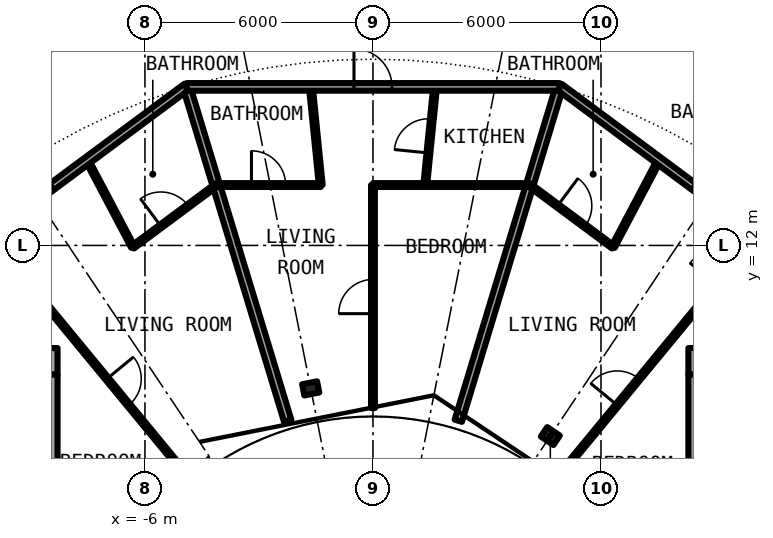
"""IFC4 building model, lengths in metres.
Left out: names, types, materials, properties, quantities, classifications, styles, units other than length and angle.
Written with IfcOpenShell. Run it as: python <this file> out.ifc"""

import sys

from ifc_helpers import new_model, si_unit, direction, frame, frame_2d, origin, origin_2d, place, context, subcontext, project, spatial, rectangle, i_section, extrude, element, fill, save


model = new_model("IFC4")
c1 = context("Model", 3, precision=1e-05, world=origin(), true_north=direction((0.0, 1.0)))
c2 = subcontext(c1, "Body", "Model", "MODEL_VIEW")
j1 = project(units=[si_unit("LENGTHUNIT", "METRE"), si_unit("PLANEANGLEUNIT", "RADIAN")], contexts=[c1])
p1 = place(None, origin())
s1 = spatial("IfcSite", under=j1, at=p1, CompositionType="ELEMENT")
p2 = place(p1, origin())
s2 = spatial("IfcBuilding", under=s1, at=p2, CompositionType="ELEMENT")
p3 = place(p2, frame((0.0, 0.0, 75.8)))
s3 = spatial("IfcBuildingStorey", under=s2, at=p3, CompositionType="ELEMENT", Elevation=75.8)
for number, where, z_axis, x_axis in (
    (1, (4.667, 6.984, 0.0), (0.0, 0.0, 1.0), (0.556, 0.831, 0.0)),
    (2, (-1.639, 8.239, 0.0), (0.0, 0.0, 1.0), (-0.195, 0.981, 0.0)),
):
    element("IfcColumn", number, at=place(p3, frame(where, z_axis=z_axis, x_axis=x_axis)), inside=s3, PredefinedType="COLUMN", context=c2, shape_type="SweptSolid", body=[
        extrude(i_section(OverallWidth=0.3, OverallDepth=0.4, WebThickness=0.013, FlangeThickness=0.024, FilletRadius=0.027, at=origin_2d()), origin(), (0.0, 0.0, 1.0), 3.05),
    ])
p4 = place(p3, frame((22.3, 8.95, 0.0), z_axis=(0.0, 0.0, 1.0), x_axis=(-1.0, 0.0, 0.0)))
e3 = element("IfcWall", 3, at=p4, inside=s3, PredefinedType="SHEAR", context=c2, shape_type="SweptSolid", body=[
    extrude(rectangle(XDim=14.0, YDim=0.7, at=frame_2d((7.0, 0.0))), origin(), (0.0, 0.0, 1.0), 3.05),
])
p5 = place(p4, frame((1.225, 0.0, 0.0)))
e4 = element("IfcOpeningElement", 4, at=p5, cuts=e3, PredefinedType="OPENING", context=c2, shape_type="SweptSolid", body=[
    extrude(rectangle(XDim=1.2, YDim=2.3, at=frame_2d((0.6, 1.15))), frame((0.0, 0.36, 0.0), z_axis=(0.0, -1.0, 0.0), x_axis=(1.0, 0.0, 0.0)), (0.0, 0.0, 1.0), 0.72),
])
p6 = place(p3, frame((8.65, -8.6, 0.0), z_axis=(0.0, 0.0, 1.0), x_axis=(0.0, 1.0, 0.0)))
e5 = element("IfcWall", 5, at=p6, inside=s3, PredefinedType="SHEAR", context=c2, shape_type="SweptSolid", body=[
    extrude(rectangle(XDim=17.2, YDim=0.7, at=frame_2d((8.6, 0.0))), origin(), (0.0, 0.0, 1.0), 3.05),
])
p7 = place(p6, frame((7.4, 0.0, 0.1)))
e6 = element("IfcOpeningElement", 6, at=p7, cuts=e5, PredefinedType="OPENING", context=c2, shape_type="SweptSolid", body=[
    extrude(rectangle(XDim=2.4, YDim=2.2, at=frame_2d((1.2, 1.1))), frame((0.0, 0.36, 0.0), z_axis=(0.0, -1.0, 0.0), x_axis=(1.0, 0.0, 0.0)), (0.0, 0.0, 1.0), 0.72),
])
p8 = place(p3, frame((-8.3, 8.95, 0.0), z_axis=(0.0, 0.0, 1.0), x_axis=(-1.0, 0.0, 0.0)))
e7 = element("IfcWall", 7, at=p8, inside=s3, PredefinedType="SHEAR", context=c2, shape_type="SweptSolid", body=[
    extrude(rectangle(XDim=14.0, YDim=0.7, at=frame_2d((7.0, 0.0))), origin(), (0.0, 0.0, 1.0), 3.05),
])
p9 = place(p8, frame((11.575, 0.0, 0.0)))
e8 = element("IfcOpeningElement", 8, at=p9, cuts=e7, PredefinedType="OPENING", context=c2, shape_type="SweptSolid", body=[
    extrude(rectangle(XDim=1.2, YDim=2.3, at=frame_2d((0.6, 1.15))), frame((0.0, 0.36, 0.0), z_axis=(0.0, -1.0, 0.0), x_axis=(1.0, 0.0, 0.0)), (0.0, 0.0, 1.0), 0.72),
])
p10 = place(p3, frame((-8.65, 8.6, 0.0), z_axis=(0.0, 0.0, 1.0), x_axis=(0.0, -1.0, 0.0)))
e9 = element("IfcWall", 9, at=p10, inside=s3, PredefinedType="SHEAR", context=c2, shape_type="SweptSolid", body=[
    extrude(rectangle(XDim=17.2, YDim=0.7, at=frame_2d((8.6, 0.0))), origin(), (0.0, 0.0, 1.0), 3.05),
])
p11 = place(p10, frame((7.4, 0.0, 0.1)))
e10 = element("IfcOpeningElement", 10, at=p11, cuts=e9, PredefinedType="OPENING", context=c2, shape_type="SweptSolid", body=[
    extrude(rectangle(XDim=2.4, YDim=2.2, at=frame_2d((1.2, 1.1))), frame((0.0, 0.36, 0.0), z_axis=(0.0, -1.0, 0.0), x_axis=(1.0, 0.0, 0.0)), (0.0, 0.0, 1.0), 0.72),
])
for number, where, z_axis, x_axis in (
    (11, (-4.907, 16.172, 0.0), (0.0, 0.0, 1.0), (0.29, -0.957, 0.0)),
    (12, (2.245, 7.387, 0.0), (0.0, 0.0, 1.0), (0.29, 0.957, 0.0)),
):
    element("IfcWall", number, at=place(p3, frame(where, z_axis=z_axis, x_axis=x_axis)), inside=s3, PredefinedType="PARTITIONING", context=c2, shape_type="SweptSolid", body=[
        extrude(rectangle(XDim=9.18, YDim=0.2, at=frame_2d((4.59, 0.0))), origin(), (0.0, 0.0, 1.0), 2.7),
    ])
p12 = place(p3, frame((-10.132, 12.296, 0.0), z_axis=(0.0, 0.0, 1.0), x_axis=(0.635976043025, -0.771708800454, 0.0)))
e13 = element("IfcWall", 13, at=p12, inside=s3, PredefinedType="PARTITIONING", context=c2, shape_type="SweptSolid", body=[
    extrude(rectangle(XDim=8.213, YDim=0.1, at=frame_2d((4.106, 0.0))), origin(), (0.0, 0.0, 1.0), 2.7),
])
p13 = place(p12, frame((0.823, 0.0, 0.0)))
e14 = element("IfcOpeningElement", 14, at=p13, cuts=e13, PredefinedType="OPENING", context=c2, shape_type="SweptSolid", body=[
    extrude(rectangle(XDim=0.9, YDim=2.3, at=frame_2d((0.45, 1.15))), frame((0.0, 0.06, 0.0), z_axis=(0.0, -1.0, 0.0), x_axis=(1.0, 0.0, 0.0)), (0.0, 0.0, 1.0), 0.12),
])
p14 = place(p12, frame((4.929, 0.0, 0.0)))
e15 = element("IfcOpeningElement", 15, at=p14, cuts=e13, PredefinedType="OPENING", context=c2, shape_type="SweptSolid", body=[
    extrude(rectangle(XDim=0.9, YDim=2.3, at=frame_2d((0.45, 1.15))), frame((0.0, 0.06, 0.0), z_axis=(0.0, -1.0, 0.0), x_axis=(1.0, 0.0, 0.0)), (0.0, 0.0, 1.0), 0.12),
])
p15 = place(p3, frame((-7.519, 14.234, 0.0), z_axis=(0.0, 0.0, 1.0), x_axis=(0.467001992543, -0.884256263173, 0.0)))
e16 = element("IfcWall", 16, at=p15, inside=s3, PredefinedType="PARTITIONING", context=c2, shape_type="SweptSolid", body=[
    extrude(rectangle(XDim=2.572, YDim=0.1, at=frame_2d((1.286, 0.0))), origin(), (0.0, 0.0, 1.0), 2.7),
])
p16 = place(p3, frame((-1.635, 16.172, 0.0), z_axis=(0.0, 0.0, 1.0), x_axis=(0.100527855112, -0.994934244233, 0.0)))
e17 = element("IfcWall", 17, at=p16, inside=s3, PredefinedType="PARTITIONING", context=c2, shape_type="SweptSolid", body=[
    extrude(rectangle(XDim=2.596, YDim=0.1, at=frame_2d((1.298, 0.0))), origin(), (0.0, 0.0, 1.0), 2.7),
])
p17 = place(p3, frame((0.0, 7.72, 0.0), z_axis=(0.0, 0.0, 1.0), x_axis=(0.0, 1.0, 0.0)))
e18 = element("IfcWall", 18, at=p17, inside=s3, PredefinedType="PARTITIONING", context=c2, shape_type="SweptSolid", body=[
    extrude(rectangle(XDim=5.869, YDim=0.1, at=frame_2d((2.935, 0.0))), origin(), (0.0, 0.0, 1.0), 2.7),
])
p18 = place(p17, frame((2.485, 0.0, 0.0)))
e19 = element("IfcOpeningElement", 19, at=p18, cuts=e18, PredefinedType="OPENING", context=c2, shape_type="SweptSolid", body=[
    extrude(rectangle(XDim=0.9, YDim=2.3, at=frame_2d((0.45, 1.15))), frame((0.0, 0.06, 0.0), z_axis=(0.0, -1.0, 0.0), x_axis=(1.0, 0.0, 0.0)), (0.0, 0.0, 1.0), 0.12),
])
p19 = place(p3, frame((1.374, 13.589, 0.0), z_axis=(0.0, 0.0, 1.0), x_axis=(0.100527855112, 0.994934244233, 0.0)))
e20 = element("IfcWall", 20, at=p19, inside=s3, PredefinedType="PARTITIONING", context=c2, shape_type="SweptSolid", body=[
    extrude(rectangle(XDim=2.596, YDim=0.1, at=frame_2d((1.298, 0.0))), origin(), (0.0, 0.0, 1.0), 2.7),
])
p20 = place(p19, frame((0.848, 0.0, 0.0)))
e21 = element("IfcOpeningElement", 21, at=p20, cuts=e20, PredefinedType="OPENING", context=c2, shape_type="SweptSolid", body=[
    extrude(rectangle(XDim=0.9, YDim=2.3, at=frame_2d((0.45, 1.15))), frame((0.0, 0.06, 0.0), z_axis=(0.0, -1.0, 0.0), x_axis=(1.0, 0.0, 0.0)), (0.0, 0.0, 1.0), 0.12),
])
p21 = place(p3, frame((4.909, 5.958, 0.0), z_axis=(0.0, 0.0, 1.0), x_axis=(0.635976043025, 0.771708800454, 0.0)))
e22 = element("IfcWall", 22, at=p21, inside=s3, PredefinedType="PARTITIONING", context=c2, shape_type="SweptSolid", body=[
    extrude(rectangle(XDim=8.213, YDim=0.1, at=frame_2d((4.106, 0.0))), origin(), (0.0, 0.0, 1.0), 2.7),
])
p22 = place(p21, frame((6.49, 0.0, 0.0)))
e23 = element("IfcOpeningElement", 23, at=p22, cuts=e22, PredefinedType="OPENING", context=c2, shape_type="SweptSolid", body=[
    extrude(rectangle(XDim=0.9, YDim=2.3, at=frame_2d((0.45, 1.15))), frame((0.0, 0.06, 0.0), z_axis=(0.0, -1.0, 0.0), x_axis=(1.0, 0.0, 0.0)), (0.0, 0.0, 1.0), 0.12),
])
p23 = place(p21, frame((2.384, 0.0, 0.0)))
e24 = element("IfcOpeningElement", 24, at=p23, cuts=e22, PredefinedType="OPENING", context=c2, shape_type="SweptSolid", body=[
    extrude(rectangle(XDim=0.9, YDim=2.3, at=frame_2d((0.45, 1.15))), frame((0.0, 0.06, 0.0), z_axis=(0.0, -1.0, 0.0), x_axis=(1.0, 0.0, 0.0)), (0.0, 0.0, 1.0), 0.12),
])
p24 = place(p3, frame((6.318, 11.96, 0.0), z_axis=(0.0, 0.0, 1.0), x_axis=(0.467001992543, 0.884256263173, 0.0)))
e25 = element("IfcWall", 25, at=p24, inside=s3, PredefinedType="PARTITIONING", context=c2, shape_type="SweptSolid", body=[
    extrude(rectangle(XDim=2.572, YDim=0.1, at=frame_2d((1.286, 0.0))), origin(), (0.0, 0.0, 1.0), 2.7),
])
p25 = place(p3, frame((-6.318, 11.96, 0.0), z_axis=(0.0, 0.0, 1.0), x_axis=(0.803128348509, 0.595806055542, 0.0)))
e26 = element("IfcWall", 26, at=p25, inside=s3, PredefinedType="PARTITIONING", context=c2, shape_type="SweptSolid", body=[
    extrude(rectangle(XDim=2.734, YDim=0.1, at=frame_2d((1.367, 0.0))), origin(), (0.0, 0.0, 1.0), 2.7),
])
p26 = place(p25, frame((0.917, 0.0, 0.0)))
e27 = element("IfcOpeningElement", 27, at=p26, cuts=e26, PredefinedType="OPENING", context=c2, shape_type="SweptSolid", body=[
    extrude(rectangle(XDim=0.9, YDim=2.3, at=frame_2d((0.45, 1.15))), frame((0.0, 0.06, 0.0), z_axis=(0.0, -1.0, 0.0), x_axis=(1.0, 0.0, 0.0)), (0.0, 0.0, 1.0), 0.12),
])
p27 = place(p3, frame((4.122, 13.589, 0.0), z_axis=(0.0, 0.0, 1.0), x_axis=(0.803128348509, -0.595806055542, 0.0)))
e28 = element("IfcWall", 28, at=p27, inside=s3, PredefinedType="PARTITIONING", context=c2, shape_type="SweptSolid", body=[
    extrude(rectangle(XDim=2.734, YDim=0.1, at=frame_2d((1.367, 0.0))), origin(), (0.0, 0.0, 1.0), 2.7),
])
p28 = place(p27, frame((0.917, 0.0, 0.0)))
e29 = element("IfcOpeningElement", 29, at=p28, cuts=e28, PredefinedType="OPENING", context=c2, shape_type="SweptSolid", body=[
    extrude(rectangle(XDim=0.9, YDim=2.3, at=frame_2d((0.45, 1.15))), frame((0.0, 0.06, 0.0), z_axis=(0.0, -1.0, 0.0), x_axis=(1.0, 0.0, 0.0)), (0.0, 0.0, 1.0), 0.12),
])
p29 = place(p3, frame((-4.122, 13.589, 0.0), z_axis=(0.0, 0.0, 1.0), x_axis=(1.0, 0.0, 0.0)))
e30 = element("IfcWall", 30, at=p29, inside=s3, PredefinedType="PARTITIONING", context=c2, shape_type="SweptSolid", body=[
    extrude(rectangle(XDim=2.748, YDim=0.1, at=frame_2d((1.374, 0.0))), origin(), (0.0, 0.0, 1.0), 2.7),
])
p30 = place(p29, frame((0.924, 0.0, 0.0)))
e31 = element("IfcOpeningElement", 31, at=p30, cuts=e30, PredefinedType="OPENING", context=c2, shape_type="SweptSolid", body=[
    extrude(rectangle(XDim=0.9, YDim=2.3, at=frame_2d((0.45, 1.15))), frame((0.0, 0.06, 0.0), z_axis=(0.0, -1.0, 0.0), x_axis=(1.0, 0.0, 0.0)), (0.0, 0.0, 1.0), 0.12),
])
p31 = place(p3, frame((0.0, 13.589, 0.0), z_axis=(0.0, 0.0, 1.0), x_axis=(1.0, 0.0, 0.0)))
e32 = element("IfcWall", 32, at=p31, inside=s3, PredefinedType="PARTITIONING", context=c2, shape_type="SweptSolid", body=[
    extrude(rectangle(XDim=4.122, YDim=0.1, at=frame_2d((2.061, 0.0))), origin(), (0.0, 0.0, 1.0), 2.7),
])
p32 = place(p3, frame((-12.745, 10.358, 0.0), z_axis=(0.0, 0.0, 1.0), x_axis=(0.803191461888, 0.595720971219, 0.0)))
e33 = element("IfcWall", 33, at=p32, inside=s3, PredefinedType="PARTITIONING", context=c2, shape_type="SweptSolid", body=[
    extrude(rectangle(XDim=9.76, YDim=0.2, at=frame_2d((4.88, 0.0))), origin(), (0.0, 0.0, 1.0), 2.7),
])
p33 = place(p32, frame((4.38, 0.0, 0.0)))
e34 = element("IfcOpeningElement", 34, at=p33, cuts=e33, PredefinedType="OPENING", context=c2, shape_type="SweptSolid", body=[
    extrude(rectangle(XDim=1.0, YDim=2.3, at=frame_2d((0.5, 1.15))), frame((0.0, 0.11, 0.0), z_axis=(0.0, -1.0, 0.0), x_axis=(1.0, 0.0, 0.0)), (0.0, 0.0, 1.0), 0.22),
])
p34 = place(p3, frame((4.906, 16.172, 0.0), z_axis=(0.0, 0.0, 1.0), x_axis=(0.803191461888, -0.595720971219, 0.0)))
e35 = element("IfcWall", 35, at=p34, inside=s3, PredefinedType="PARTITIONING", context=c2, shape_type="SweptSolid", body=[
    extrude(rectangle(XDim=9.76, YDim=0.2, at=frame_2d((4.88, 0.0))), origin(), (0.0, 0.0, 1.0), 2.7),
])
p35 = place(p34, frame((4.38, 0.0, 0.0)))
e36 = element("IfcOpeningElement", 36, at=p35, cuts=e35, PredefinedType="OPENING", context=c2, shape_type="SweptSolid", body=[
    extrude(rectangle(XDim=1.0, YDim=2.3, at=frame_2d((0.5, 1.15))), frame((0.0, 0.11, 0.0), z_axis=(0.0, -1.0, 0.0), x_axis=(1.0, 0.0, 0.0)), (0.0, 0.0, 1.0), 0.22),
])
p36 = place(p3, frame((-4.906, 16.172, 0.0), z_axis=(0.0, 0.0, 1.0), x_axis=(1.0, 0.0, 0.0)))
e37 = element("IfcWall", 37, at=p36, inside=s3, PredefinedType="PARTITIONING", context=c2, shape_type="SweptSolid", body=[
    extrude(rectangle(XDim=9.812, YDim=0.2, at=frame_2d((4.906, 0.0))), origin(), (0.0, 0.0, 1.0), 2.7),
])
p37 = place(p36, frame((4.406, 0.0, 0.0)))
e38 = element("IfcOpeningElement", 38, at=p37, cuts=e37, PredefinedType="OPENING", context=c2, shape_type="SweptSolid", body=[
    extrude(rectangle(XDim=1.0, YDim=2.3, at=frame_2d((0.5, 1.15))), frame((0.0, 0.11, 0.0), z_axis=(0.0, -1.0, 0.0), x_axis=(1.0, 0.0, 0.0)), (0.0, 0.0, 1.0), 0.22),
])
p38 = place(p3, frame((-12.434, 15.151, 0.0), z_axis=(0.0, 0.0, 1.0), x_axis=(0.881899173092, 0.47143806433, 0.0)))
e39 = element("IfcWall", 39, at=p38, inside=s3, PredefinedType="PARTITIONING", context=c2, shape_type="SweptSolid", body=[
    extrude(rectangle(XDim=7.647, YDim=0.2, at=frame_2d((3.824, 0.0))), origin(), (0.0, 0.0, 1.0), 2.38),
])
p39 = place(p38, frame((2.55, 0.0, 0.0)))
e40 = element("IfcOpeningElement", 40, at=p39, cuts=e39, PredefinedType="OPENING", context=c2, shape_type="SweptSolid", body=[
    extrude(rectangle(XDim=1.0, YDim=2.3, at=frame_2d((0.5, 1.15))), frame((0.0, 0.11, 0.0), z_axis=(0.0, -1.0, 0.0), x_axis=(1.0, 0.0, 0.0)), (0.0, 0.0, 1.0), 0.22),
])
p40 = place(p3, frame((5.69, 18.756, 0.0), z_axis=(0.0, 0.0, 1.0), x_axis=(0.903901201372, -0.427741298169, 0.0)))
e41 = element("IfcWall", 41, at=p40, inside=s3, PredefinedType="PARTITIONING", context=c2, shape_type="SweptSolid", body=[
    extrude(rectangle(XDim=5.597, YDim=0.2, at=frame_2d((2.798, 0.0))), origin(), (0.0, 0.0, 1.0), 2.38),
])
p41 = place(p40, frame((3.334, 0.0, 0.0)))
e42 = element("IfcOpeningElement", 42, at=p41, cuts=e41, PredefinedType="OPENING", context=c2, shape_type="SweptSolid", body=[
    extrude(rectangle(XDim=1.0, YDim=2.3, at=frame_2d((0.5, 1.15))), frame((0.0, 0.11, 0.0), z_axis=(0.0, -1.0, 0.0), x_axis=(1.0, 0.0, 0.0)), (0.0, 0.0, 1.0), 0.22),
])
p42 = place(p35, origin())
e43 = element("IfcDoor", 43, at=p42, inside=s3, OperationType="SINGLE_SWING_LEFT", PredefinedType="DOOR", context=c2, shape_type="SweptSolid", body=[
    extrude(rectangle(XDim=1.0, YDim=2.3, at=frame_2d((0.5, 1.15))), frame((0.0, 0.025, 0.0), z_axis=(0.0, -1.0, 0.0), x_axis=(1.0, 0.0, 0.0)), (0.0, 0.0, 1.0), 0.05),
])
fill(e36, e43)
p43 = place(p28, origin())
e44 = element("IfcDoor", 44, at=p43, inside=s3, OperationType="SINGLE_SWING_LEFT", PredefinedType="DOOR", context=c2, shape_type="SweptSolid", body=[
    extrude(rectangle(XDim=0.9, YDim=2.3, at=frame_2d((0.45, 1.15))), frame((0.0, 0.025, 0.0), z_axis=(0.0, -1.0, 0.0), x_axis=(1.0, 0.0, 0.0)), (0.0, 0.0, 1.0), 0.05),
])
fill(e29, e44)
p44 = place(p23, origin())
e45 = element("IfcDoor", 45, at=p44, inside=s3, OperationType="SINGLE_SWING_LEFT", PredefinedType="DOOR", context=c2, shape_type="SweptSolid", body=[
    extrude(rectangle(XDim=0.9, YDim=2.3, at=frame_2d((0.45, 1.15))), frame((0.0, 0.025, 0.0), z_axis=(0.0, -1.0, 0.0), x_axis=(1.0, 0.0, 0.0)), (0.0, 0.0, 1.0), 0.05),
])
fill(e24, e45)
p45 = place(p37, origin())
e46 = element("IfcDoor", 46, at=p45, inside=s3, OperationType="SINGLE_SWING_LEFT", PredefinedType="DOOR", context=c2, shape_type="SweptSolid", body=[
    extrude(rectangle(XDim=1.0, YDim=2.3, at=frame_2d((0.5, 1.15))), frame((0.0, 0.025, 0.0), z_axis=(0.0, -1.0, 0.0), x_axis=(1.0, 0.0, 0.0)), (0.0, 0.0, 1.0), 0.05),
])
fill(e38, e46)
p46 = place(p30, origin())
e47 = element("IfcDoor", 47, at=p46, inside=s3, OperationType="SINGLE_SWING_LEFT", PredefinedType="DOOR", context=c2, shape_type="SweptSolid", body=[
    extrude(rectangle(XDim=0.9, YDim=2.3, at=frame_2d((0.45, 1.15))), frame((0.0, 0.025, 0.0), z_axis=(0.0, -1.0, 0.0), x_axis=(1.0, 0.0, 0.0)), (0.0, 0.0, 1.0), 0.05),
])
fill(e31, e47)
p47 = place(p20, origin())
e48 = element("IfcDoor", 48, at=p47, inside=s3, OperationType="SINGLE_SWING_RIGHT", PredefinedType="DOOR", context=c2, shape_type="SweptSolid", body=[
    extrude(rectangle(XDim=0.9, YDim=2.3, at=frame_2d((0.45, 1.15))), frame((0.0, 0.025, 0.0), z_axis=(0.0, -1.0, 0.0), x_axis=(1.0, 0.0, 0.0)), (0.0, 0.0, 1.0), 0.05),
])
fill(e21, e48)
p48 = place(p18, origin())
e49 = element("IfcDoor", 49, at=p48, inside=s3, OperationType="SINGLE_SWING_RIGHT", PredefinedType="DOOR", context=c2, shape_type="SweptSolid", body=[
    extrude(rectangle(XDim=0.9, YDim=2.3, at=frame_2d((0.45, 1.15))), frame((0.0, 0.025, 0.0), z_axis=(0.0, -1.0, 0.0), x_axis=(1.0, 0.0, 0.0)), (0.0, 0.0, 1.0), 0.05),
])
fill(e19, e49)
p49 = place(p33, origin())
e50 = element("IfcDoor", 50, at=p49, inside=s3, OperationType="SINGLE_SWING_RIGHT", PredefinedType="DOOR", context=c2, shape_type="SweptSolid", body=[
    extrude(rectangle(XDim=1.0, YDim=2.3, at=frame_2d((0.5, 1.15))), frame((0.0, 0.025, 0.0), z_axis=(0.0, -1.0, 0.0), x_axis=(1.0, 0.0, 0.0)), (0.0, 0.0, 1.0), 0.05),
])
fill(e34, e50)
p50 = place(p26, origin())
e51 = element("IfcDoor", 51, at=p50, inside=s3, OperationType="SINGLE_SWING_RIGHT", PredefinedType="DOOR", context=c2, shape_type="SweptSolid", body=[
    extrude(rectangle(XDim=0.9, YDim=2.3, at=frame_2d((0.45, 1.15))), frame((0.0, 0.025, 0.0), z_axis=(0.0, -1.0, 0.0), x_axis=(1.0, 0.0, 0.0)), (0.0, 0.0, 1.0), 0.05),
])
fill(e27, e51)
p51 = place(p14, origin())
e52 = element("IfcDoor", 52, at=p51, inside=s3, OperationType="SINGLE_SWING_RIGHT", PredefinedType="DOOR", context=c2, shape_type="SweptSolid", body=[
    extrude(rectangle(XDim=0.9, YDim=2.3, at=frame_2d((0.45, 1.15))), frame((0.0, 0.025, 0.0), z_axis=(0.0, -1.0, 0.0), x_axis=(1.0, 0.0, 0.0)), (0.0, 0.0, 1.0), 0.05),
])
fill(e15, e52)
save(model, sys.argv[1])
